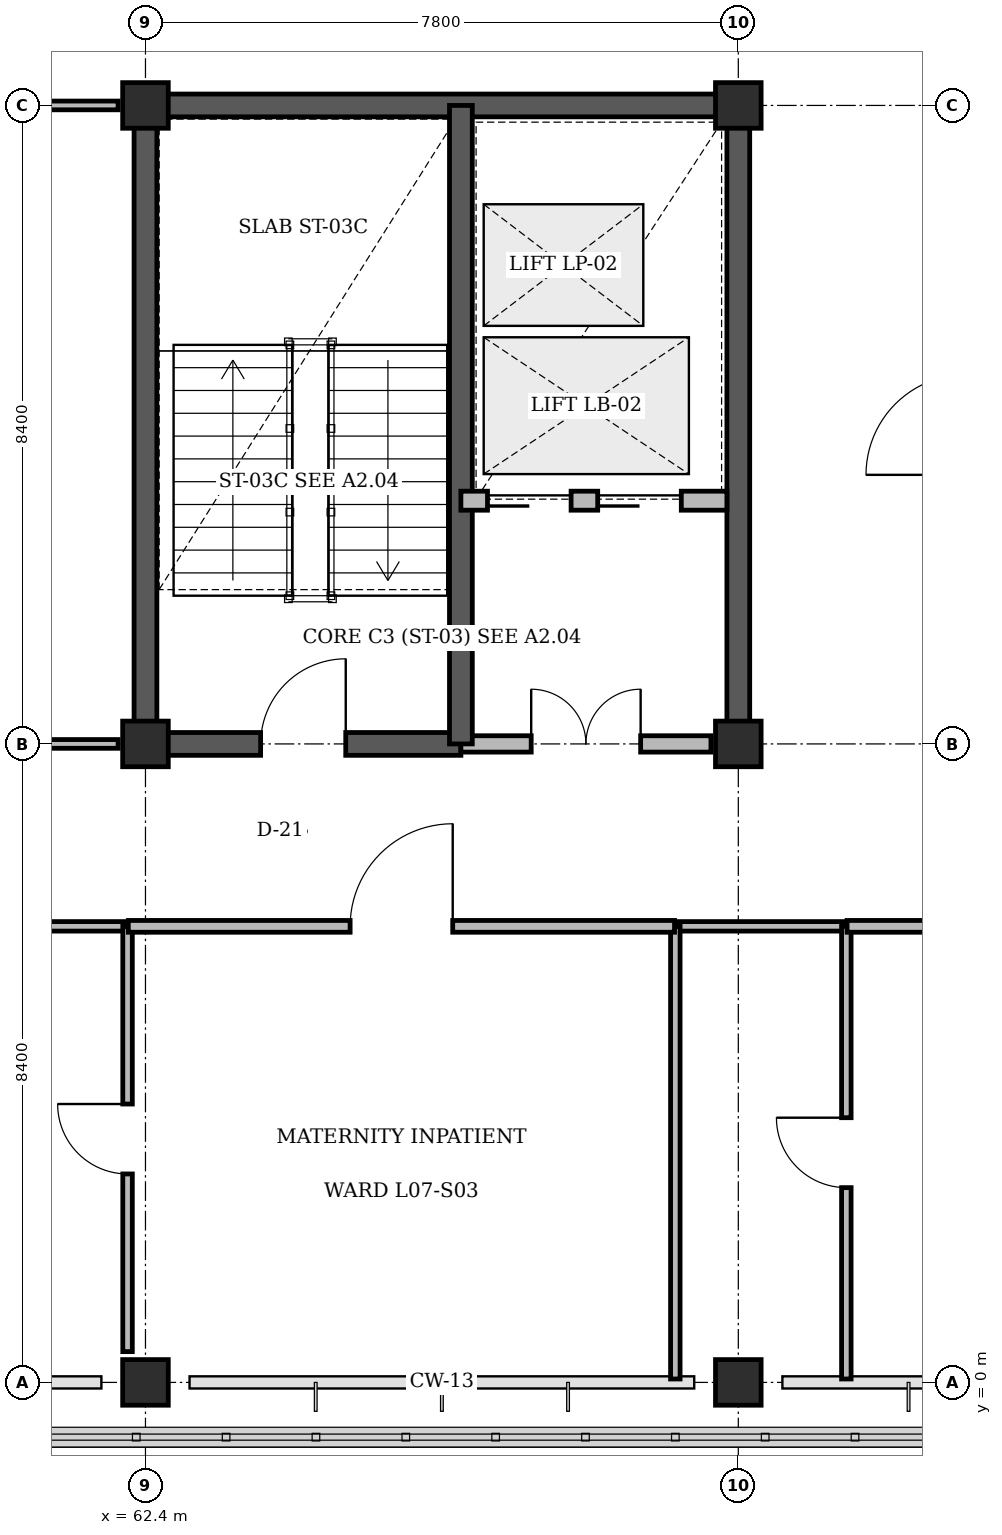
"""IFC4 building model, lengths in metres.
Left out: names, types, materials, properties, quantities, classifications, styles, units other than length and angle.
Written with IfcOpenShell. Run it as: python <this file> out.ifc"""

import sys

from ifc_helpers import new_model, si_unit, direction, frame, frame_2d, origin, origin_2d, place, context, subcontext, project, spatial, rectangle, extrude, element, fill, save


model = new_model("IFC4")
c1 = context("Model", 3, precision=1e-05, world=origin(), true_north=direction((0.0, 1.0)))
c2 = subcontext(c1, "Body", "Model", "MODEL_VIEW")
j1 = project(units=[si_unit("LENGTHUNIT", "METRE"), si_unit("PLANEANGLEUNIT", "RADIAN")], contexts=[c1])
p1 = place(None, origin())
s1 = spatial("IfcSite", under=j1, at=p1, CompositionType="ELEMENT")
p2 = place(p1, origin())
s2 = spatial("IfcBuilding", under=s1, at=p2, CompositionType="ELEMENT")
p3 = place(p2, frame((0.0, 0.0, 30.6)))
s3 = spatial("IfcBuildingStorey", under=s2, at=p3, CompositionType="ELEMENT", Elevation=30.6)
p4 = place(p3, frame((62.25, 16.8, 0.0), z_axis=(0.0, 0.0, 1.0), x_axis=(1.0, 0.0, 0.0)))
e1 = element("IfcWall", 1, at=p4, inside=s3, PredefinedType="SHEAR", context=c2, shape_type="SweptSolid", body=[
    extrude(rectangle(XDim=8.1, YDim=0.3, at=frame_2d((4.05, 0.0))), origin(), (0.0, 0.0, 1.0), 3.92),
])
for number, where, z_axis, x_axis in (
    (2, (62.4, 8.4, 0.0), (0.0, 0.0, 1.0), (0.0, 1.0, 0.0)),
    (3, (70.2, 8.4, 0.0), (0.0, 0.0, 1.0), (0.0, 1.0, 0.0)),
):
    element("IfcWall", number, at=place(p3, frame(where, z_axis=z_axis, x_axis=x_axis)), inside=s3, PredefinedType="SHEAR", context=c2, shape_type="SweptSolid", body=[
        extrude(rectangle(XDim=8.4, YDim=0.3, at=frame_2d((4.2, 0.0))), origin(), (0.0, 0.0, 1.0), 3.92),
    ])
for number, where, z_axis, x_axis in (
    (4, (62.4, 0.0, 0.0), (0.0, 0.0, 1.0), (1.0, 0.0, 0.0)),
    (5, (62.4, 8.4, 0.0), (0.0, 0.0, 1.0), (1.0, 0.0, 0.0)),
    (6, (62.4, 16.8, 0.0), (0.0, 0.0, 1.0), (1.0, 0.0, 0.0)),
    (7, (70.2, 0.0, 0.0), (0.0, 0.0, 1.0), (1.0, 0.0, 0.0)),
    (8, (70.2, 8.4, 0.0), (0.0, 0.0, 1.0), (1.0, 0.0, 0.0)),
    (9, (70.2, 16.8, 0.0), (0.0, 0.0, 1.0), (1.0, 0.0, 0.0)),
):
    element("IfcColumn", number, at=place(p3, frame(where, z_axis=z_axis, x_axis=x_axis)), inside=s3, PredefinedType="COLUMN", context=c2, shape_type="SweptSolid", body=[
        extrude(rectangle(XDim=0.6, YDim=0.6, at=origin_2d()), origin(), (0.0, 0.0, 1.0), 4.2),
    ])
p5 = place(p3, frame((62.4, 8.4, 0.0), z_axis=(0.0, 0.0, 1.0), x_axis=(1.0, 0.0, 0.0)))
e10 = element("IfcWall", 10, at=p5, inside=s3, PredefinedType="SHEAR", context=c2, shape_type="SweptSolid", body=[
    extrude(rectangle(XDim=4.15, YDim=0.3, at=frame_2d((2.075, 0.0))), origin(), (0.0, 0.0, 1.0), 4.2),
])
p6 = place(p5, frame((1.515, 0.0, 0.0)))
e11 = element("IfcOpeningElement", 11, at=p6, cuts=e10, PredefinedType="OPENING", context=c2, shape_type="SweptSolid", body=[
    extrude(rectangle(XDim=1.12, YDim=2.15, at=frame_2d((0.56, 1.075))), frame((0.0, 0.16, 0.0), z_axis=(0.0, -1.0, 0.0), x_axis=(1.0, 0.0, 0.0)), (0.0, 0.0, 1.0), 0.32),
])
p7 = place(p3, frame((66.55, 8.4, 0.0), z_axis=(0.0, 0.0, 1.0), x_axis=(1.0, 0.0, 0.0)))
e12 = element("IfcWall", 12, at=p7, inside=s3, PredefinedType="STANDARD", context=c2, shape_type="SweptSolid", body=[
    extrude(rectangle(XDim=3.29, YDim=0.215, at=frame_2d((1.645, 0.0))), origin(), (0.0, 0.0, 1.0), 3.305),
])
p8 = place(p7, frame((0.925, 0.0, 0.0)))
e13 = element("IfcOpeningElement", 13, at=p8, cuts=e12, PredefinedType="OPENING", context=c2, shape_type="SweptSolid", body=[
    extrude(rectangle(XDim=1.44, YDim=2.2, at=frame_2d((0.72, 1.1))), frame((0.0, 0.118, 0.0), z_axis=(0.0, -1.0, 0.0), x_axis=(1.0, 0.0, 0.0)), (0.0, 0.0, 1.0), 0.235),
])
p9 = place(p3, frame((66.55, 8.4, 0.0), z_axis=(0.0, 0.0, 1.0), x_axis=(0.0, 1.0, 0.0)))
e14 = element("IfcWall", 14, at=p9, inside=s3, PredefinedType="SHEAR", context=c2, shape_type="SweptSolid", body=[
    extrude(rectangle(XDim=8.4, YDim=0.3, at=frame_2d((4.2, 0.0))), origin(), (0.0, 0.0, 1.0), 4.2),
])
p10 = place(p3, frame((66.55, 11.6, 0.0), z_axis=(0.0, 0.0, 1.0), x_axis=(1.0, 0.0, 0.0)))
e15 = element("IfcWall", 15, at=p10, inside=s3, PredefinedType="STANDARD", context=c2, shape_type="SweptSolid", body=[
    extrude(rectangle(XDim=3.5, YDim=0.25, at=frame_2d((1.75, 0.0))), origin(), (0.0, 0.0, 1.0), 3.9),
])
p11 = place(p10, frame((0.35, 0.0, 0.0)))
e16 = element("IfcOpeningElement", 16, at=p11, cuts=e15, PredefinedType="OPENING", context=c2, shape_type="SweptSolid", body=[
    extrude(rectangle(XDim=1.1, YDim=2.2, at=frame_2d((0.55, 1.1))), frame((0.0, 0.135, 0.0), z_axis=(0.0, -1.0, 0.0), x_axis=(1.0, 0.0, 0.0)), (0.0, 0.0, 1.0), 0.27),
])
p12 = place(p10, frame((1.8, 0.0, 0.0)))
e17 = element("IfcOpeningElement", 17, at=p12, cuts=e15, PredefinedType="OPENING", context=c2, shape_type="SweptSolid", body=[
    extrude(rectangle(XDim=1.1, YDim=2.2, at=frame_2d((0.55, 1.1))), frame((0.0, 0.135, 0.0), z_axis=(0.0, -1.0, 0.0), x_axis=(1.0, 0.0, 0.0)), (0.0, 0.0, 1.0), 0.27),
])
p13 = place(p3, frame((59.914, 6.0, 0.0), z_axis=(0.0, 0.0, 1.0), x_axis=(1.0, 0.0, 0.0)))
e18 = element("IfcWall", 18, at=p13, inside=s3, PredefinedType="PARTITIONING", context=c2, shape_type="SweptSolid", body=[
    extrude(rectangle(XDim=2.25, YDim=0.125, at=frame_2d((1.125, 0.0))), origin(), (0.0, 0.0, 1.0), 3.9),
])
p14 = place(p3, frame((62.164, 0.405, 0.0), z_axis=(0.0, 0.0, 1.0), x_axis=(0.0, 1.0, 0.0)))
e19 = element("IfcWall", 19, at=p14, inside=s3, PredefinedType="PARTITIONING", context=c2, shape_type="SweptSolid", body=[
    extrude(rectangle(XDim=5.595, YDim=0.125, at=frame_2d((2.797, 0.0))), origin(), (0.0, 0.0, 1.0), 3.305),
])
p15 = place(p14, frame((2.337, 0.0, 0.0)))
e20 = element("IfcOpeningElement", 20, at=p15, cuts=e19, PredefinedType="OPENING", context=c2, shape_type="SweptSolid", body=[
    extrude(rectangle(XDim=0.92, YDim=2.1, at=frame_2d((0.46, 1.05))), frame((0.0, 0.073, 0.0), z_axis=(0.0, -1.0, 0.0), x_axis=(1.0, 0.0, 0.0)), (0.0, 0.0, 1.0), 0.145),
])
p16 = place(p3, frame((69.371, 6.0, 0.0), z_axis=(0.0, 0.0, 1.0), x_axis=(1.0, 0.0, 0.0)))
e21 = element("IfcWall", 21, at=p16, inside=s3, PredefinedType="PARTITIONING", context=c2, shape_type="SweptSolid", body=[
    extrude(rectangle(XDim=2.25, YDim=0.125, at=frame_2d((1.125, 0.0))), origin(), (0.0, 0.0, 1.0), 3.9),
])
p17 = place(p3, frame((69.371, 0.045, 0.0), z_axis=(0.0, 0.0, 1.0), x_axis=(0.0, 1.0, 0.0)))
e22 = element("IfcWall", 22, at=p17, inside=s3, PredefinedType="PARTITIONING", context=c2, shape_type="SweptSolid", body=[
    extrude(rectangle(XDim=5.955, YDim=0.125, at=frame_2d((2.978, 0.0))), origin(), (0.0, 0.0, 1.0), 3.9),
])
p18 = place(p3, frame((71.621, 0.045, 0.0), z_axis=(0.0, 0.0, 1.0), x_axis=(0.0, 1.0, 0.0)))
e23 = element("IfcWall", 23, at=p18, inside=s3, PredefinedType="PARTITIONING", context=c2, shape_type="SweptSolid", body=[
    extrude(rectangle(XDim=5.955, YDim=0.125, at=frame_2d((2.978, 0.0))), origin(), (0.0, 0.0, 1.0), 3.9),
])
p19 = place(p18, frame((2.518, 0.0, 0.0)))
e24 = element("IfcOpeningElement", 24, at=p19, cuts=e23, PredefinedType="OPENING", context=c2, shape_type="SweptSolid", body=[
    extrude(rectangle(XDim=0.92, YDim=2.1, at=frame_2d((0.46, 1.05))), frame((0.0, 0.073, 0.0), z_axis=(0.0, -1.0, 0.0), x_axis=(1.0, 0.0, 0.0)), (0.0, 0.0, 1.0), 0.145),
])
p20 = place(p3, frame((62.174, 6.0, 0.0), z_axis=(0.0, 0.0, 1.0), x_axis=(1.0, 0.0, 0.0)))
e25 = element("IfcWall", 25, at=p20, inside=s3, PredefinedType="PARTITIONING", context=c2, shape_type="SweptSolid", body=[
    extrude(rectangle(XDim=7.187, YDim=0.155, at=frame_2d((3.594, 0.0))), origin(), (0.0, 0.0, 1.0), 3.9),
])
p21 = place(p20, frame((2.918, 0.0, 0.0)))
e26 = element("IfcOpeningElement", 26, at=p21, cuts=e25, PredefinedType="OPENING", context=c2, shape_type="SweptSolid", body=[
    extrude(rectangle(XDim=1.35, YDim=2.2, at=frame_2d((0.675, 1.1))), frame((0.0, 0.087, 0.0), z_axis=(0.0, -1.0, 0.0), x_axis=(1.0, 0.0, 0.0)), (0.0, 0.0, 1.0), 0.175),
])
p22 = place(p3, frame((71.631, 6.0, 0.0), z_axis=(0.0, 0.0, 1.0), x_axis=(1.0, 0.0, 0.0)))
e27 = element("IfcWall", 27, at=p22, inside=s3, PredefinedType="PARTITIONING", context=c2, shape_type="SweptSolid", body=[
    extrude(rectangle(XDim=7.188, YDim=0.155, at=frame_2d((3.594, 0.0))), origin(), (0.0, 0.0, 1.0), 3.9),
])
p23 = place(p22, frame((2.919, 0.0, 0.0)))
e28 = element("IfcOpeningElement", 28, at=p23, cuts=e27, PredefinedType="OPENING", context=c2, shape_type="SweptSolid", body=[
    extrude(rectangle(XDim=1.35, YDim=2.2, at=frame_2d((0.675, 1.1))), frame((0.0, 0.087, 0.0), z_axis=(0.0, -1.0, 0.0), x_axis=(1.0, 0.0, 0.0)), (0.0, 0.0, 1.0), 0.175),
])
p24 = place(p3, frame((54.96, 8.4, 0.0), z_axis=(0.0, 0.0, 1.0), x_axis=(1.0, 0.0, 0.0)))
e29 = element("IfcWall", 29, at=p24, inside=s3, PredefinedType="PARTITIONING", context=c2, shape_type="SweptSolid", body=[
    extrude(rectangle(XDim=7.08, YDim=0.115, at=frame_2d((3.54, 0.0))), origin(), (0.0, 0.0, 1.0), 3.305),
])
p25 = place(p24, frame((2.88, 0.0, 0.0)))
e30 = element("IfcOpeningElement", 30, at=p25, cuts=e29, PredefinedType="OPENING", context=c2, shape_type="SweptSolid", body=[
    extrude(rectangle(XDim=1.32, YDim=2.15, at=frame_2d((0.66, 1.075))), frame((0.0, 0.067, 0.0), z_axis=(0.0, -1.0, 0.0), x_axis=(1.0, 0.0, 0.0)), (0.0, 0.0, 1.0), 0.135),
])
p26 = place(p3, frame((54.96, 16.8, 0.0), z_axis=(0.0, 0.0, 1.0), x_axis=(1.0, 0.0, 0.0)))
e31 = element("IfcWall", 31, at=p26, inside=s3, PredefinedType="PARTITIONING", context=c2, shape_type="SweptSolid", body=[
    extrude(rectangle(XDim=7.08, YDim=0.115, at=frame_2d((3.54, 0.0))), origin(), (0.0, 0.0, 1.0), 3.305),
])
p27 = place(p6, origin())
e32 = element("IfcDoor", 32, at=p27, inside=s3, OperationType="SINGLE_SWING_RIGHT", PredefinedType="DOOR", context=c2, shape_type="SweptSolid", body=[
    extrude(rectangle(XDim=1.12, YDim=2.15, at=frame_2d((0.56, 1.075))), frame((0.0, 0.025, 0.0), z_axis=(0.0, -1.0, 0.0), x_axis=(1.0, 0.0, 0.0)), (0.0, 0.0, 1.0), 0.05),
])
fill(e11, e32)
p28 = place(p8, origin())
e33 = element("IfcDoor", 33, at=p28, inside=s3, OperationType="DOUBLE_DOOR_SINGLE_SWING", PredefinedType="DOOR", context=c2, shape_type="SweptSolid", body=[
    extrude(rectangle(XDim=1.44, YDim=2.2, at=frame_2d((0.72, 1.1))), frame((0.0, 0.025, 0.0), z_axis=(0.0, -1.0, 0.0), x_axis=(1.0, 0.0, 0.0)), (0.0, 0.0, 1.0), 0.05),
])
fill(e13, e33)
p29 = place(p11, origin())
e34 = element("IfcDoor", 34, at=p29, inside=s3, OperationType="SLIDING_TO_LEFT", PredefinedType="DOOR", context=c2, shape_type="SweptSolid", body=[
    extrude(rectangle(XDim=1.1, YDim=2.2, at=frame_2d((0.55, 1.1))), frame((0.0, 0.025, 0.0), z_axis=(0.0, -1.0, 0.0), x_axis=(1.0, 0.0, 0.0)), (0.0, 0.0, 1.0), 0.05),
])
fill(e16, e34)
p30 = place(p12, origin())
e35 = element("IfcDoor", 35, at=p30, inside=s3, OperationType="SLIDING_TO_LEFT", PredefinedType="DOOR", context=c2, shape_type="SweptSolid", body=[
    extrude(rectangle(XDim=1.1, YDim=2.2, at=frame_2d((0.55, 1.1))), frame((0.0, 0.025, 0.0), z_axis=(0.0, -1.0, 0.0), x_axis=(1.0, 0.0, 0.0)), (0.0, 0.0, 1.0), 0.05),
])
fill(e17, e35)
p31 = place(p15, origin())
e36 = element("IfcDoor", 36, at=p31, inside=s3, OperationType="SINGLE_SWING_RIGHT", PredefinedType="DOOR", context=c2, shape_type="SweptSolid", body=[
    extrude(rectangle(XDim=0.92, YDim=2.1, at=frame_2d((0.46, 1.05))), frame((0.0, 0.025, 0.0), z_axis=(0.0, -1.0, 0.0), x_axis=(1.0, 0.0, 0.0)), (0.0, 0.0, 1.0), 0.05),
])
fill(e20, e36)
p32 = place(p19, origin())
e37 = element("IfcDoor", 37, at=p32, inside=s3, OperationType="SINGLE_SWING_RIGHT", PredefinedType="DOOR", context=c2, shape_type="SweptSolid", body=[
    extrude(rectangle(XDim=0.92, YDim=2.1, at=frame_2d((0.46, 1.05))), frame((0.0, 0.025, 0.0), z_axis=(0.0, -1.0, 0.0), x_axis=(1.0, 0.0, 0.0)), (0.0, 0.0, 1.0), 0.05),
])
fill(e24, e37)
p33 = place(p21, origin())
e38 = element("IfcDoor", 38, at=p33, inside=s3, OperationType="SINGLE_SWING_RIGHT", PredefinedType="DOOR", context=c2, shape_type="SweptSolid", body=[
    extrude(rectangle(XDim=1.35, YDim=2.2, at=frame_2d((0.675, 1.1))), frame((0.0, 0.025, 0.0), z_axis=(0.0, -1.0, 0.0), x_axis=(1.0, 0.0, 0.0)), (0.0, 0.0, 1.0), 0.05),
])
fill(e26, e38)
save(model, sys.argv[1])
